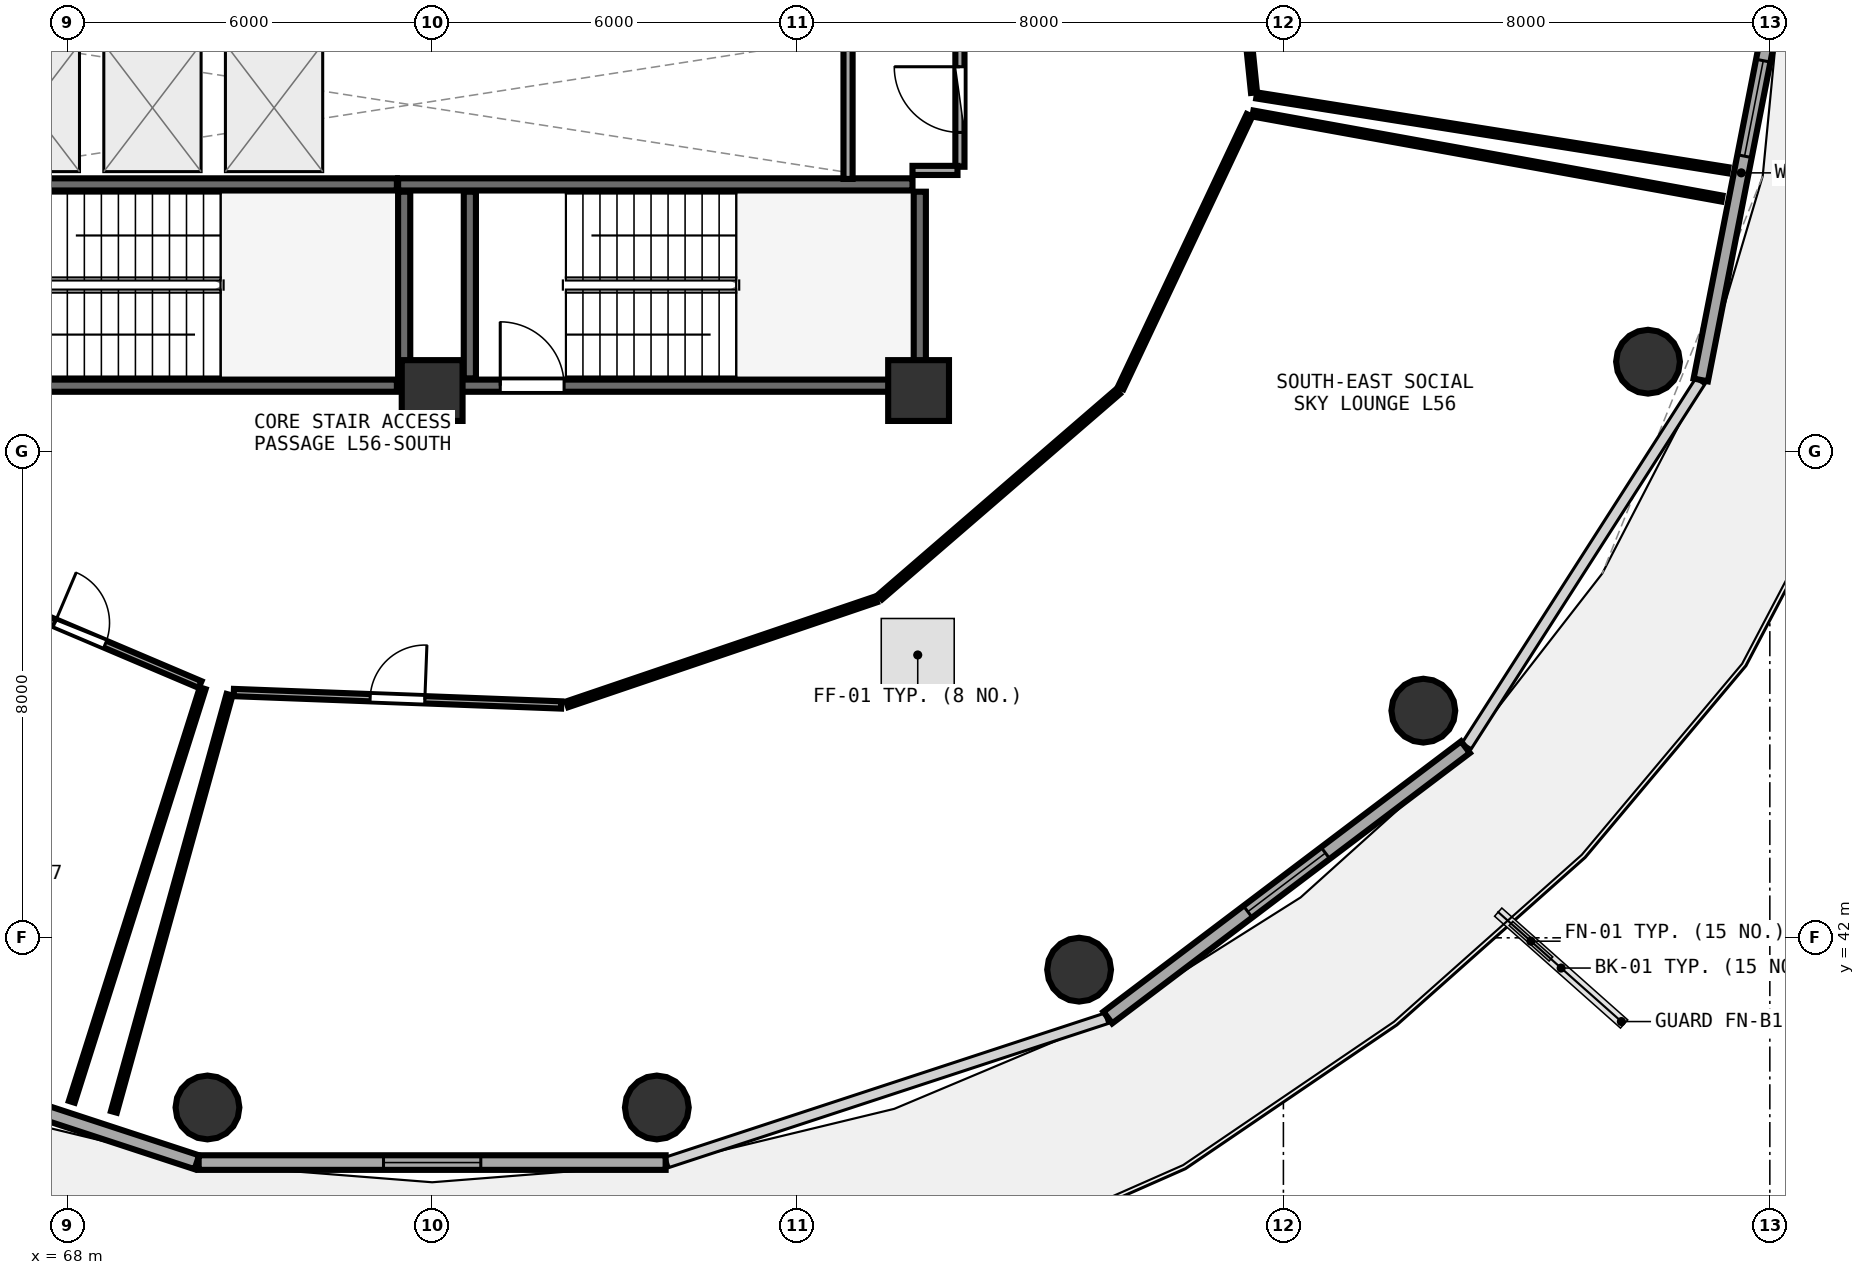
"""IFC4 building model, lengths in metres.
Left out: names, types, materials, properties, quantities, classifications, styles, units other than length and angle.
Written with IfcOpenShell. Run it as: python <this file> out.ifc"""

import sys

from ifc_helpers import new_model, si_unit, direction, frame, frame_2d, origin, origin_2d, place, context, subcontext, project, spatial, rectangle, circle, extrude, element, fill, save


model = new_model("IFC4")
c1 = context("Model", 3, precision=1e-05, world=origin(), true_north=direction((0.0, 1.0)))
c2 = subcontext(c1, "Body", "Model", "MODEL_VIEW")
j1 = project(units=[si_unit("LENGTHUNIT", "METRE"), si_unit("PLANEANGLEUNIT", "RADIAN")], contexts=[c1])
p1 = place(None, origin())
s1 = spatial("IfcSite", under=j1, at=p1, CompositionType="ELEMENT")
p2 = place(p1, origin())
s2 = spatial("IfcBuilding", under=s1, at=p2, CompositionType="ELEMENT")
p3 = place(p2, frame((0.0, 0.0, 219.45)))
s3 = spatial("IfcBuildingStorey", under=s2, at=p3, CompositionType="ELEMENT", Elevation=219.45)
for number, where, z_axis, x_axis in (
    (1, (74.0, 51.0, 0.0), (0.0, 0.0, 1.0), (1.0, 0.0, 0.0)),
    (2, (82.0, 51.0, 0.0), (0.0, 0.0, 1.0), (1.0, 0.0, 0.0)),
):
    element("IfcColumn", number, at=place(p3, frame(where, z_axis=z_axis, x_axis=x_axis)), inside=s3, PredefinedType="PILASTER", context=c2, shape_type="SweptSolid", body=[
        extrude(rectangle(XDim=1.0, YDim=1.0, at=origin_2d()), origin(), (0.0, 0.0, 1.0), 3.75),
    ])
for number, where, z_axis, x_axis in (
    (3, (70.305, 39.21, 0.0), (0.0, 0.0, 1.0), (1.0, 0.0, 0.0)),
    (4, (77.695, 39.21, 0.0), (0.0, 0.0, 1.0), (1.0, 0.0, 0.0)),
    (5, (84.64, 41.476, 0.0), (0.0, 0.0, 1.0), (1.0, 0.0, 0.0)),
    (6, (90.302, 45.736, 0.0), (0.0, 0.0, 1.0), (1.0, 0.0, 0.0)),
    (7, (93.997, 51.474, 0.0), (0.0, 0.0, 1.0), (1.0, 0.0, 0.0)),
):
    element("IfcColumn", number, at=place(p3, frame(where, z_axis=z_axis, x_axis=x_axis)), inside=s3, PredefinedType="COLUMN", context=c2, shape_type="SweptSolid", body=[
        extrude(circle(Radius=0.525, at=origin_2d()), origin(), (0.0, 0.0, 1.0), 3.75),
    ])
p4 = place(p3, frame((62.914, 40.675, 0.0), z_axis=(0.0, 0.0, 1.0), x_axis=(0.95022142767, -0.31157541366, 0.0)))
e8 = element("IfcWall", 8, at=p4, inside=s3, PredefinedType="SOLIDWALL", context=c2, shape_type="SweptSolid", body=[
    extrude(rectangle(XDim=7.594, YDim=0.24, at=frame_2d((3.797, 0.0))), origin(), (0.0, 0.0, 1.0), 3.475),
])
p5 = place(p4, frame((2.997, 0.0, 0.85)))
e9 = element("IfcOpeningElement", 9, at=p5, cuts=e8, PredefinedType="OPENING", context=c2, shape_type="SweptSolid", body=[
    extrude(rectangle(XDim=1.6, YDim=1.45, at=frame_2d((0.8, 0.725))), frame((0.0, 0.13, 0.0), z_axis=(0.0, -1.0, 0.0), x_axis=(1.0, 0.0, 0.0)), (0.0, 0.0, 1.0), 0.26),
])
p6 = place(p3, frame((70.16, 38.304, 0.0), z_axis=(0.0, 0.0, 1.0), x_axis=(1.0, 0.0, 0.0)))
e10 = element("IfcWall", 10, at=p6, inside=s3, PredefinedType="SOLIDWALL", context=c2, shape_type="SweptSolid", body=[
    extrude(rectangle(XDim=7.68, YDim=0.24, at=frame_2d((3.84, 0.0))), origin(), (0.0, 0.0, 1.0), 3.475),
])
p7 = place(p6, frame((3.04, 0.0, 0.85)))
e11 = element("IfcOpeningElement", 11, at=p7, cuts=e10, PredefinedType="OPENING", context=c2, shape_type="SweptSolid", body=[
    extrude(rectangle(XDim=1.6, YDim=1.45, at=frame_2d((0.8, 0.725))), frame((0.0, 0.13, 0.0), z_axis=(0.0, -1.0, 0.0), x_axis=(1.0, 0.0, 0.0)), (0.0, 0.0, 1.0), 0.26),
])
p8 = place(p3, frame((85.112, 40.688, 0.0), z_axis=(0.0, 0.0, 1.0), x_axis=(0.797701674595, 0.603052268338, 0.0)))
e12 = element("IfcWall", 12, at=p8, inside=s3, PredefinedType="SOLIDWALL", context=c2, shape_type="SweptSolid", body=[
    extrude(rectangle(XDim=7.374, YDim=0.24, at=frame_2d((3.687, 0.0))), origin(), (0.0, 0.0, 1.0), 3.475),
])
p9 = place(p8, frame((2.887, 0.0, 0.85)))
e13 = element("IfcOpeningElement", 13, at=p9, cuts=e12, PredefinedType="OPENING", context=c2, shape_type="SweptSolid", body=[
    extrude(rectangle(XDim=1.6, YDim=1.45, at=frame_2d((0.8, 0.725))), frame((0.0, 0.13, 0.0), z_axis=(0.0, -1.0, 0.0), x_axis=(1.0, 0.0, 0.0)), (0.0, 0.0, 1.0), 0.26),
])
p10 = place(p3, frame((94.864, 51.174, 0.0), z_axis=(0.0, 0.0, 1.0), x_axis=(0.192069055673, 0.981381413036, 0.0)))
e14 = element("IfcWall", 14, at=p10, inside=s3, PredefinedType="SOLIDWALL", context=c2, shape_type="SweptSolid", body=[
    extrude(rectangle(XDim=6.94, YDim=0.24, at=frame_2d((3.47, 0.0))), origin(), (0.0, 0.0, 1.0), 3.475),
])
p11 = place(p10, frame((3.75, 0.0, 0.85)))
e15 = element("IfcOpeningElement", 15, at=p11, cuts=e14, PredefinedType="OPENING", context=c2, shape_type="SweptSolid", body=[
    extrude(rectangle(XDim=1.6, YDim=1.45, at=frame_2d((0.8, 0.725))), frame((0.0, 0.13, 0.0), z_axis=(0.0, -1.0, 0.0), x_axis=(1.0, 0.0, 0.0)), (0.0, 0.0, 1.0), 0.26),
])
p12 = place(p3, frame((74.0, 51.08, 0.0), z_axis=(0.0, 0.0, 1.0), x_axis=(1.0, 0.0, 0.0)))
e16 = element("IfcWall", 16, at=p12, inside=s3, PredefinedType="SHEAR", context=c2, shape_type="SweptSolid", body=[
    extrude(rectangle(XDim=7.9, YDim=0.2, at=frame_2d((3.95, 0.0))), origin(), (0.0, 0.0, 1.0), 3.49),
])
p13 = place(p12, frame((1.12, 0.0, 0.0)))
e17 = element("IfcOpeningElement", 17, at=p13, cuts=e16, PredefinedType="OPENING", context=c2, shape_type="SweptSolid", body=[
    extrude(rectangle(XDim=1.05, YDim=2.1, at=frame_2d((0.525, 1.05))), frame((0.0, 0.11, 0.0), z_axis=(0.0, -1.0, 0.0), x_axis=(1.0, 0.0, 0.0)), (0.0, 0.0, 1.0), 0.22),
])
p14 = place(p3, frame((82.02, 51.2, 0.0), z_axis=(0.0, 0.0, 1.0), x_axis=(0.0, 1.0, 0.0)))
e18 = element("IfcWall", 18, at=p14, inside=s3, PredefinedType="SHEAR", context=c2, shape_type="SweptSolid", body=[
    extrude(rectangle(XDim=3.07, YDim=0.2, at=frame_2d((1.535, 0.0))), origin(), (0.0, 0.0, 1.0), 3.49),
])
p15 = place(p3, frame((81.9, 54.39, 0.0), z_axis=(0.0, 0.0, 1.0), x_axis=(-1.0, 0.0, 0.0)))
e19 = element("IfcWall", 19, at=p15, inside=s3, PredefinedType="SHEAR", context=c2, shape_type="SweptSolid", body=[
    extrude(rectangle(XDim=8.46, YDim=0.2, at=frame_2d((4.23, 0.0))), origin(), (0.0, 0.0, 1.0), 3.49),
])
p16 = place(p3, frame((74.62, 54.27, 0.0), z_axis=(0.0, 0.0, 1.0), x_axis=(0.0, -1.0, 0.0)))
e20 = element("IfcWall", 20, at=p16, inside=s3, PredefinedType="SHEAR", context=c2, shape_type="SweptSolid", body=[
    extrude(rectangle(XDim=3.07, YDim=0.2, at=frame_2d((1.535, 0.0))), origin(), (0.0, 0.0, 1.0), 3.49),
])
p17 = place(p3, frame((66.26, 51.08, 0.0), z_axis=(0.0, 0.0, 1.0), x_axis=(1.0, 0.0, 0.0)))
e21 = element("IfcWall", 21, at=p17, inside=s3, PredefinedType="SHEAR", context=c2, shape_type="SweptSolid", body=[
    extrude(rectangle(XDim=7.16, YDim=0.2, at=frame_2d((3.58, 0.0))), origin(), (0.0, 0.0, 1.0), 3.49),
])
p18 = place(p3, frame((73.54, 51.2, 0.0), z_axis=(0.0, 0.0, 1.0), x_axis=(0.0, 1.0, 0.0)))
e22 = element("IfcWall", 22, at=p18, inside=s3, PredefinedType="SHEAR", context=c2, shape_type="SweptSolid", body=[
    extrude(rectangle(XDim=3.07, YDim=0.2, at=frame_2d((1.535, 0.0))), origin(), (0.0, 0.0, 1.0), 3.49),
])
p19 = place(p3, frame((73.42, 54.39, 0.0), z_axis=(0.0, 0.0, 1.0), x_axis=(-1.0, 0.0, 0.0)))
e23 = element("IfcWall", 23, at=p19, inside=s3, PredefinedType="SHEAR", context=c2, shape_type="SweptSolid", body=[
    extrude(rectangle(XDim=7.16, YDim=0.2, at=frame_2d((3.58, 0.0))), origin(), (0.0, 0.0, 1.0), 3.49),
])
p20 = place(p3, frame((80.84, 54.48, 0.0), z_axis=(0.0, 0.0, 1.0), x_axis=(0.0, 1.0, 0.0)))
e24 = element("IfcWall", 24, at=p20, inside=s3, PredefinedType="PARTITIONING", context=c2, shape_type="SweptSolid", body=[
    extrude(rectangle(XDim=2.29, YDim=0.15, at=frame_2d((1.145, 0.0))), origin(), (0.0, 0.0, 1.0), 3.48),
])
p21 = place(p3, frame((82.68, 54.68, 0.0), z_axis=(0.0, 0.0, 1.0), x_axis=(0.0, 1.0, 0.0)))
e25 = element("IfcWall", 25, at=p21, inside=s3, PredefinedType="PARTITIONING", context=c2, shape_type="SweptSolid", body=[
    extrude(rectangle(XDim=2.21, YDim=0.15, at=frame_2d((1.105, 0.0))), origin(), (0.0, 0.0, 1.0), 3.48),
])
p22 = place(p21, frame((0.565, 0.0, 0.0)))
e26 = element("IfcOpeningElement", 26, at=p22, cuts=e25, PredefinedType="OPENING", context=c2, shape_type="SweptSolid", body=[
    extrude(rectangle(XDim=1.08, YDim=2.1, at=frame_2d((0.54, 1.05))), frame((0.0, 0.085, 0.0), z_axis=(0.0, -1.0, 0.0), x_axis=(1.0, 0.0, 0.0)), (0.0, 0.0, 1.0), 0.17),
])
p23 = place(p3, frame((70.738, 46.034, 0.0), z_axis=(0.0, 0.0, 1.0), x_axis=(0.99928078405, -0.037919844777, 0.0)))
e27 = element("IfcWall", 27, at=p23, inside=s3, PredefinedType="PARTITIONING", context=c2, shape_type="SweptSolid", body=[
    extrude(rectangle(XDim=5.389, YDim=0.12, at=frame_2d((2.694, 0.0))), origin(), (0.0, 0.0, 1.0), 3.025),
])
p24 = place(p23, frame((2.244, 0.0, 0.0)))
e28 = element("IfcOpeningElement", 28, at=p24, cuts=e27, PredefinedType="OPENING", context=c2, shape_type="SweptSolid", body=[
    extrude(rectangle(XDim=0.9, YDim=2.08, at=frame_2d((0.45, 1.04))), frame((0.0, 0.07, 0.0), z_axis=(0.0, -1.0, 0.0), x_axis=(1.0, 0.0, 0.0)), (0.0, 0.0, 1.0), 0.14),
])
p25 = place(p3, frame((66.233, 47.843, 0.0), z_axis=(0.0, 0.0, 1.0), x_axis=(0.920481353999, -0.390786485105, 0.0)))
e29 = element("IfcWall", 29, at=p25, inside=s3, PredefinedType="PARTITIONING", context=c2, shape_type="SweptSolid", body=[
    extrude(rectangle(XDim=4.292, YDim=0.12, at=frame_2d((2.146, 0.0))), origin(), (0.0, 0.0, 1.0), 3.235),
])
p26 = place(p25, frame((1.696, 0.0, 0.0)))
e30 = element("IfcOpeningElement", 30, at=p26, cuts=e29, PredefinedType="OPENING", context=c2, shape_type="SweptSolid", body=[
    extrude(rectangle(XDim=0.9, YDim=2.08, at=frame_2d((0.45, 1.04))), frame((0.0, 0.07, 0.0), z_axis=(0.0, -1.0, 0.0), x_axis=(1.0, 0.0, 0.0)), (0.0, 0.0, 1.0), 0.14),
])
p27 = place(p3, frame((81.9, 54.62, 0.0), z_axis=(0.0, 0.0, 1.0), x_axis=(1.0, 0.0, 0.0)))
e31 = element("IfcWall", 31, at=p27, inside=s3, PredefinedType="PARTITIONING", context=c2, shape_type="SweptSolid", body=[
    extrude(rectangle(XDim=0.74, YDim=0.15, at=frame_2d((0.37, 0.0))), origin(), (0.0, 0.0, 1.0), 2.775),
])
p28 = place(p3, frame((76.221, 45.84, 0.0), z_axis=(0.0, 0.0, 1.0), x_axis=(0.946842090113, 0.321698704367, 0.0)))
e32 = element("IfcWall", 32, at=p28, inside=s3, PredefinedType="PARTITIONING", context=c2, shape_type="SweptSolid", body=[
    extrude(rectangle(XDim=5.363, YDim=0.1, at=frame_2d((2.682, 0.0))), origin(), (0.0, 0.0, 1.0), 3.235),
])
p29 = place(p3, frame((81.367, 47.604, 0.0), z_axis=(0.0, 0.0, 1.0), x_axis=(0.756843194568, 0.653596495428, 0.0)))
e33 = element("IfcWall", 33, at=p29, inside=s3, PredefinedType="PARTITIONING", context=c2, shape_type="SweptSolid", body=[
    extrude(rectangle(XDim=5.167, YDim=0.1, at=frame_2d((2.583, 0.0))), origin(), (0.0, 0.0, 1.0), 3.025),
])
p30 = place(p3, frame((85.325, 51.043, 0.0), z_axis=(0.0, 0.0, 1.0), x_axis=(0.426911240237, 0.904293532521, 0.0)))
e34 = element("IfcWall", 34, at=p30, inside=s3, PredefinedType="PARTITIONING", context=c2, shape_type="SweptSolid", body=[
    extrude(rectangle(XDim=4.958, YDim=0.1, at=frame_2d((2.479, 0.0))), origin(), (0.0, 0.0, 1.0), 3.025),
])
p31 = place(p3, frame((87.498, 55.556, 0.0), z_axis=(0.0, 0.0, 1.0), x_axis=(0.983952512008, -0.178430530217, 0.0)))
e35 = element("IfcWall", 35, at=p31, inside=s3, PredefinedType="PARTITIONING", context=c2, shape_type="SweptSolid", body=[
    extrude(rectangle(XDim=7.84, YDim=0.1, at=frame_2d((3.92, 0.0))), origin(), (0.0, 0.0, 1.0), 3.075),
])
p32 = place(p3, frame((68.766, 39.137, 0.0), z_axis=(0.0, 0.0, 1.0), x_axis=(0.267125564166, 0.96366173161, 0.0)))
e36 = element("IfcWall", 36, at=p32, inside=s3, PredefinedType="PARTITIONING", context=c2, shape_type="SweptSolid", body=[
    extrude(rectangle(XDim=7.119, YDim=0.1, at=frame_2d((3.56, 0.0))), origin(), (0.0, 0.0, 1.0), 3.075),
])
p33 = place(p3, frame((87.517, 55.899, 0.0), z_axis=(0.0, 0.0, 1.0), x_axis=(-0.101648252044, 0.994820402312, 0.0)))
e37 = element("IfcWall", 37, at=p33, inside=s3, PredefinedType="PARTITIONING", context=c2, shape_type="SweptSolid", body=[
    extrude(rectangle(XDim=6.413, YDim=0.1, at=frame_2d((3.207, 0.0))), origin(), (0.0, 0.0, 1.0), 3.025),
])
p34 = place(p3, frame((95.312, 54.623, 0.0), z_axis=(0.0, 0.0, 1.0), x_axis=(-0.987651731417, 0.156665431505, 0.0)))
e38 = element("IfcWall", 38, at=p34, inside=s3, PredefinedType="PARTITIONING", context=c2, shape_type="SweptSolid", body=[
    extrude(rectangle(XDim=7.848, YDim=0.1, at=frame_2d((3.924, 0.0))), origin(), (0.0, 0.0, 1.0), 3.075),
])
p35 = place(p3, frame((70.227, 46.104, 0.0), z_axis=(0.0, 0.0, 1.0), x_axis=(-0.30191088513, -0.953336151334, 0.0)))
e39 = element("IfcWall", 39, at=p35, inside=s3, PredefinedType="PARTITIONING", context=c2, shape_type="SweptSolid", body=[
    extrude(rectangle(XDim=7.134, YDim=0.1, at=frame_2d((3.567, 0.0))), origin(), (0.0, 0.0, 1.0), 3.075),
])
p36 = place(p7, origin())
e40 = element("IfcWindow", 40, at=p36, inside=s3, PartitioningType="SINGLE_PANEL", PredefinedType="WINDOW", context=c2, shape_type="SweptSolid", body=[
    extrude(rectangle(XDim=1.6, YDim=1.45, at=frame_2d((0.8, 0.725))), frame((0.0, 0.03, 0.0), z_axis=(0.0, -1.0, 0.0), x_axis=(1.0, 0.0, 0.0)), (0.0, 0.0, 1.0), 0.06),
])
fill(e11, e40)
p37 = place(p9, origin())
e41 = element("IfcWindow", 41, at=p37, inside=s3, PartitioningType="SINGLE_PANEL", PredefinedType="WINDOW", context=c2, shape_type="SweptSolid", body=[
    extrude(rectangle(XDim=1.6, YDim=1.45, at=frame_2d((0.8, 0.725))), frame((0.0, 0.03, 0.0), z_axis=(0.0, -1.0, 0.0), x_axis=(1.0, 0.0, 0.0)), (0.0, 0.0, 1.0), 0.06),
])
fill(e13, e41)
p38 = place(p11, origin())
e42 = element("IfcWindow", 42, at=p38, inside=s3, PartitioningType="SINGLE_PANEL", PredefinedType="WINDOW", context=c2, shape_type="SweptSolid", body=[
    extrude(rectangle(XDim=1.6, YDim=1.45, at=frame_2d((0.8, 0.725))), frame((0.0, 0.03, 0.0), z_axis=(0.0, -1.0, 0.0), x_axis=(1.0, 0.0, 0.0)), (0.0, 0.0, 1.0), 0.06),
])
fill(e15, e42)
p39 = place(p13, origin())
e43 = element("IfcDoor", 43, at=p39, inside=s3, OperationType="SINGLE_SWING_LEFT", PredefinedType="DOOR", context=c2, shape_type="SweptSolid", body=[
    extrude(rectangle(XDim=1.05, YDim=2.1, at=frame_2d((0.525, 1.05))), frame((0.0, 0.025, 0.0), z_axis=(0.0, -1.0, 0.0), x_axis=(1.0, 0.0, 0.0)), (0.0, 0.0, 1.0), 0.05),
])
fill(e17, e43)
p40 = place(p22, origin())
e44 = element("IfcDoor", 44, at=p40, inside=s3, OperationType="SINGLE_SWING_RIGHT", PredefinedType="DOOR", context=c2, shape_type="SweptSolid", body=[
    extrude(rectangle(XDim=1.08, YDim=2.1, at=frame_2d((0.54, 1.05))), frame((0.0, 0.025, 0.0), z_axis=(0.0, -1.0, 0.0), x_axis=(1.0, 0.0, 0.0)), (0.0, 0.0, 1.0), 0.05),
])
fill(e26, e44)
p41 = place(p24, origin())
e45 = element("IfcDoor", 45, at=p41, inside=s3, OperationType="SINGLE_SWING_RIGHT", PredefinedType="DOOR", context=c2, shape_type="SweptSolid", body=[
    extrude(rectangle(XDim=0.9, YDim=2.08, at=frame_2d((0.45, 1.04))), frame((0.0, 0.025, 0.0), z_axis=(0.0, -1.0, 0.0), x_axis=(1.0, 0.0, 0.0)), (0.0, 0.0, 1.0), 0.05),
])
fill(e28, e45)
p42 = place(p26, origin())
e46 = element("IfcDoor", 46, at=p42, inside=s3, OperationType="SINGLE_SWING_LEFT", PredefinedType="DOOR", context=c2, shape_type="SweptSolid", body=[
    extrude(rectangle(XDim=0.9, YDim=2.08, at=frame_2d((0.45, 1.04))), frame((0.0, 0.025, 0.0), z_axis=(0.0, -1.0, 0.0), x_axis=(1.0, 0.0, 0.0)), (0.0, 0.0, 1.0), 0.05),
])
fill(e30, e46)
save(model, sys.argv[1])
